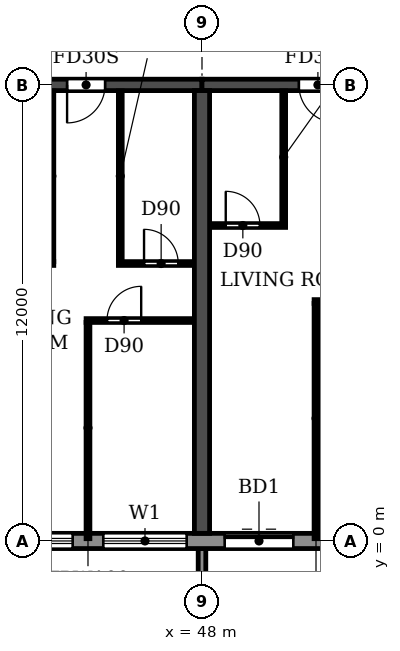
"""IFC4 building model, lengths in metres.
Left out: names, types, materials, properties, quantities, classifications, styles, units other than length and angle.
Written with IfcOpenShell. Run it as: python <this file> out.ifc"""

import sys

from ifc_helpers import new_model, si_unit, direction, frame, frame_2d, origin, place, context, subcontext, project, spatial, polyline, rectangle, outline, extrude, source, transform, mapped, element, fill, save


model = new_model("IFC4")
c1 = context("Model", 3, precision=1e-05, world=origin(), true_north=direction((0.0, 1.0)))
c2 = subcontext(c1, "Body", "Model", "MODEL_VIEW")
j1 = project(units=[si_unit("LENGTHUNIT", "METRE"), si_unit("PLANEANGLEUNIT", "RADIAN")], contexts=[c1])
p1 = place(None, origin())
s1 = spatial("IfcSite", under=j1, at=p1, CompositionType="ELEMENT")
p2 = place(p1, origin())
s2 = spatial("IfcBuilding", under=s1, at=p2, CompositionType="ELEMENT")
p3 = place(p2, frame((0.0, 0.0, 23.4)))
s3 = spatial("IfcBuildingStorey", under=s2, at=p3, CompositionType="ELEMENT", Elevation=23.4)
p4 = place(p3, frame((48.0, 0.2, 0.0), z_axis=(0.0, 0.0, 1.0), x_axis=(0.0, 1.0, 0.0)))
e1 = element("IfcWall", 1, at=p4, inside=s3, PredefinedType="SHEAR", context=c2, shape_type="SweptSolid", body=[
    extrude(rectangle(XDim=11.65, YDim=0.4, at=frame_2d((5.825, 0.0))), origin(), (0.0, 0.0, 1.0), 3.05),
])
p5 = place(p3, frame((42.0, 12.0, 0.0), z_axis=(0.0, 0.0, 1.0), x_axis=(1.0, 0.0, 0.0)))
e2 = element("IfcWall", 2, at=p5, inside=s3, PredefinedType="SHEAR", context=c2, shape_type="SweptSolid", body=[
    extrude(rectangle(XDim=6.0, YDim=0.3, at=frame_2d((3.0, 0.0))), origin(), (0.0, 0.0, 1.0), 2.45),
])
p6 = place(p5, frame((2.45, 0.0, 0.0)))
e3 = element("IfcOpeningElement", 3, at=p6, cuts=e2, PredefinedType="OPENING", context=c2, shape_type="SweptSolid", body=[
    extrude(rectangle(XDim=1.0, YDim=2.1, at=frame_2d((0.5, 1.05))), frame((0.0, 0.16, 0.0), z_axis=(0.0, -1.0, 0.0), x_axis=(1.0, 0.0, 0.0)), (0.0, 0.0, 1.0), 0.32),
])
p7 = place(p3, frame((48.0, 12.0, 0.0), z_axis=(0.0, 0.0, 1.0), x_axis=(1.0, 0.0, 0.0)))
e4 = element("IfcWall", 4, at=p7, inside=s3, PredefinedType="SHEAR", context=c2, shape_type="SweptSolid", body=[
    extrude(rectangle(XDim=6.0, YDim=0.3, at=frame_2d((3.0, 0.0))), origin(), (0.0, 0.0, 1.0), 2.45),
])
p8 = place(p7, frame((2.55, 0.0, 0.0)))
e5 = element("IfcOpeningElement", 5, at=p8, cuts=e4, PredefinedType="OPENING", context=c2, shape_type="SweptSolid", body=[
    extrude(rectangle(XDim=1.0, YDim=2.1, at=frame_2d((0.5, 1.05))), frame((0.0, 0.16, 0.0), z_axis=(0.0, -1.0, 0.0), x_axis=(1.0, 0.0, 0.0)), (0.0, 0.0, 1.0), 0.32),
])
p9 = place(p3, frame((4.683, 0.0, 0.0), z_axis=(0.0, 0.0, 1.0), x_axis=(1.0, 0.0, 0.0)))
e6 = element("IfcWall", 6, at=p9, inside=s3, PredefinedType="STANDARD", context=c2, shape_type="SweptSolid", body=[
    extrude(rectangle(XDim=92.634, YDim=0.4, at=frame_2d((46.317, 0.0))), origin(), (0.0, 0.0, 1.0), 3.05),
])
p10 = place(p9, frame((1.717, 0.0, 0.9)))
e7 = element("IfcOpeningElement", 7, at=p10, cuts=e6, PredefinedType="OPENING", context=c2, shape_type="SweptSolid", body=[
    extrude(rectangle(XDim=2.2, YDim=1.5, at=frame_2d((1.1, 0.75))), frame((0.0, 0.21, 0.0), z_axis=(0.0, -1.0, 0.0), x_axis=(1.0, 0.0, 0.0)), (0.0, 0.0, 1.0), 0.42),
])
p11 = place(p9, frame((4.717, 0.0, 0.9)))
e8 = element("IfcOpeningElement", 8, at=p11, cuts=e6, PredefinedType="OPENING", context=c2, shape_type="SweptSolid", body=[
    extrude(rectangle(XDim=2.2, YDim=1.5, at=frame_2d((1.1, 0.75))), frame((0.0, 0.21, 0.0), z_axis=(0.0, -1.0, 0.0), x_axis=(1.0, 0.0, 0.0)), (0.0, 0.0, 1.0), 0.42),
])
p12 = place(p9, frame((7.717, 0.0, 0.9)))
e9 = element("IfcOpeningElement", 9, at=p12, cuts=e6, PredefinedType="OPENING", context=c2, shape_type="SweptSolid", body=[
    extrude(rectangle(XDim=2.2, YDim=1.5, at=frame_2d((1.1, 0.75))), frame((0.0, 0.21, 0.0), z_axis=(0.0, -1.0, 0.0), x_axis=(1.0, 0.0, 0.0)), (0.0, 0.0, 1.0), 0.42),
])
p13 = place(p9, frame((10.717, 0.0, 0.9)))
e10 = element("IfcOpeningElement", 10, at=p13, cuts=e6, PredefinedType="OPENING", context=c2, shape_type="SweptSolid", body=[
    extrude(rectangle(XDim=2.2, YDim=1.5, at=frame_2d((1.1, 0.75))), frame((0.0, 0.21, 0.0), z_axis=(0.0, -1.0, 0.0), x_axis=(1.0, 0.0, 0.0)), (0.0, 0.0, 1.0), 0.42),
])
p14 = place(p9, frame((13.717, 0.0, 0.9)))
e11 = element("IfcOpeningElement", 11, at=p14, cuts=e6, PredefinedType="OPENING", context=c2, shape_type="SweptSolid", body=[
    extrude(rectangle(XDim=2.2, YDim=1.5, at=frame_2d((1.1, 0.75))), frame((0.0, 0.21, 0.0), z_axis=(0.0, -1.0, 0.0), x_axis=(1.0, 0.0, 0.0)), (0.0, 0.0, 1.0), 0.42),
])
p15 = place(p9, frame((16.717, 0.0, 0.9)))
e12 = element("IfcOpeningElement", 12, at=p15, cuts=e6, PredefinedType="OPENING", context=c2, shape_type="SweptSolid", body=[
    extrude(rectangle(XDim=2.2, YDim=1.5, at=frame_2d((1.1, 0.75))), frame((0.0, 0.21, 0.0), z_axis=(0.0, -1.0, 0.0), x_axis=(1.0, 0.0, 0.0)), (0.0, 0.0, 1.0), 0.42),
])
p16 = place(p9, frame((19.917, 0.0, 0.0)))
e13 = element("IfcOpeningElement", 13, at=p16, cuts=e6, PredefinedType="OPENING", context=c2, shape_type="SweptSolid", body=[
    extrude(rectangle(XDim=1.8, YDim=2.4, at=frame_2d((0.9, 1.2))), frame((0.0, 0.21, 0.0), z_axis=(0.0, -1.0, 0.0), x_axis=(1.0, 0.0, 0.0)), (0.0, 0.0, 1.0), 0.42),
])
p17 = place(p9, frame((22.717, 0.0, 0.9)))
e14 = element("IfcOpeningElement", 14, at=p17, cuts=e6, PredefinedType="OPENING", context=c2, shape_type="SweptSolid", body=[
    extrude(rectangle(XDim=2.2, YDim=1.5, at=frame_2d((1.1, 0.75))), frame((0.0, 0.21, 0.0), z_axis=(0.0, -1.0, 0.0), x_axis=(1.0, 0.0, 0.0)), (0.0, 0.0, 1.0), 0.42),
])
p18 = place(p9, frame((25.717, 0.0, 0.9)))
e15 = element("IfcOpeningElement", 15, at=p18, cuts=e6, PredefinedType="OPENING", context=c2, shape_type="SweptSolid", body=[
    extrude(rectangle(XDim=2.2, YDim=1.5, at=frame_2d((1.1, 0.75))), frame((0.0, 0.21, 0.0), z_axis=(0.0, -1.0, 0.0), x_axis=(1.0, 0.0, 0.0)), (0.0, 0.0, 1.0), 0.42),
])
p19 = place(p9, frame((28.717, 0.0, 0.9)))
e16 = element("IfcOpeningElement", 16, at=p19, cuts=e6, PredefinedType="OPENING", context=c2, shape_type="SweptSolid", body=[
    extrude(rectangle(XDim=2.2, YDim=1.5, at=frame_2d((1.1, 0.75))), frame((0.0, 0.21, 0.0), z_axis=(0.0, -1.0, 0.0), x_axis=(1.0, 0.0, 0.0)), (0.0, 0.0, 1.0), 0.42),
])
p20 = place(p9, frame((31.917, 0.0, 0.0)))
e17 = element("IfcOpeningElement", 17, at=p20, cuts=e6, PredefinedType="OPENING", context=c2, shape_type="SweptSolid", body=[
    extrude(rectangle(XDim=1.8, YDim=2.4, at=frame_2d((0.9, 1.2))), frame((0.0, 0.21, 0.0), z_axis=(0.0, -1.0, 0.0), x_axis=(1.0, 0.0, 0.0)), (0.0, 0.0, 1.0), 0.42),
])
p21 = place(p9, frame((34.717, 0.0, 0.9)))
e18 = element("IfcOpeningElement", 18, at=p21, cuts=e6, PredefinedType="OPENING", context=c2, shape_type="SweptSolid", body=[
    extrude(rectangle(XDim=2.2, YDim=1.5, at=frame_2d((1.1, 0.75))), frame((0.0, 0.21, 0.0), z_axis=(0.0, -1.0, 0.0), x_axis=(1.0, 0.0, 0.0)), (0.0, 0.0, 1.0), 0.42),
])
p22 = place(p9, frame((37.717, 0.0, 0.9)))
e19 = element("IfcOpeningElement", 19, at=p22, cuts=e6, PredefinedType="OPENING", context=c2, shape_type="SweptSolid", body=[
    extrude(rectangle(XDim=2.2, YDim=1.5, at=frame_2d((1.1, 0.75))), frame((0.0, 0.21, 0.0), z_axis=(0.0, -1.0, 0.0), x_axis=(1.0, 0.0, 0.0)), (0.0, 0.0, 1.0), 0.42),
])
p23 = place(p9, frame((40.717, 0.0, 0.9)))
e20 = element("IfcOpeningElement", 20, at=p23, cuts=e6, PredefinedType="OPENING", context=c2, shape_type="SweptSolid", body=[
    extrude(rectangle(XDim=2.2, YDim=1.5, at=frame_2d((1.1, 0.75))), frame((0.0, 0.21, 0.0), z_axis=(0.0, -1.0, 0.0), x_axis=(1.0, 0.0, 0.0)), (0.0, 0.0, 1.0), 0.42),
])
p24 = place(p9, frame((43.917, 0.0, 0.0)))
e21 = element("IfcOpeningElement", 21, at=p24, cuts=e6, PredefinedType="OPENING", context=c2, shape_type="SweptSolid", body=[
    extrude(rectangle(XDim=1.8, YDim=2.4, at=frame_2d((0.9, 1.2))), frame((0.0, 0.21, 0.0), z_axis=(0.0, -1.0, 0.0), x_axis=(1.0, 0.0, 0.0)), (0.0, 0.0, 1.0), 0.42),
])
p25 = place(p9, frame((46.717, 0.0, 0.9)))
e22 = element("IfcOpeningElement", 22, at=p25, cuts=e6, PredefinedType="OPENING", context=c2, shape_type="SweptSolid", body=[
    extrude(rectangle(XDim=2.2, YDim=1.5, at=frame_2d((1.1, 0.75))), frame((0.0, 0.21, 0.0), z_axis=(0.0, -1.0, 0.0), x_axis=(1.0, 0.0, 0.0)), (0.0, 0.0, 1.0), 0.42),
])
p26 = place(p9, frame((49.717, 0.0, 0.9)))
e23 = element("IfcOpeningElement", 23, at=p26, cuts=e6, PredefinedType="OPENING", context=c2, shape_type="SweptSolid", body=[
    extrude(rectangle(XDim=2.2, YDim=1.5, at=frame_2d((1.1, 0.75))), frame((0.0, 0.21, 0.0), z_axis=(0.0, -1.0, 0.0), x_axis=(1.0, 0.0, 0.0)), (0.0, 0.0, 1.0), 0.42),
])
p27 = place(p9, frame((52.717, 0.0, 0.9)))
e24 = element("IfcOpeningElement", 24, at=p27, cuts=e6, PredefinedType="OPENING", context=c2, shape_type="SweptSolid", body=[
    extrude(rectangle(XDim=2.2, YDim=1.5, at=frame_2d((1.1, 0.75))), frame((0.0, 0.21, 0.0), z_axis=(0.0, -1.0, 0.0), x_axis=(1.0, 0.0, 0.0)), (0.0, 0.0, 1.0), 0.42),
])
p28 = place(p9, frame((55.717, 0.0, 0.9)))
e25 = element("IfcOpeningElement", 25, at=p28, cuts=e6, PredefinedType="OPENING", context=c2, shape_type="SweptSolid", body=[
    extrude(rectangle(XDim=2.2, YDim=1.5, at=frame_2d((1.1, 0.75))), frame((0.0, 0.21, 0.0), z_axis=(0.0, -1.0, 0.0), x_axis=(1.0, 0.0, 0.0)), (0.0, 0.0, 1.0), 0.42),
])
p29 = place(p9, frame((58.917, 0.0, 0.0)))
e26 = element("IfcOpeningElement", 26, at=p29, cuts=e6, PredefinedType="OPENING", context=c2, shape_type="SweptSolid", body=[
    extrude(rectangle(XDim=1.8, YDim=2.4, at=frame_2d((0.9, 1.2))), frame((0.0, 0.21, 0.0), z_axis=(0.0, -1.0, 0.0), x_axis=(1.0, 0.0, 0.0)), (0.0, 0.0, 1.0), 0.42),
])
p30 = place(p9, frame((61.717, 0.0, 0.9)))
e27 = element("IfcOpeningElement", 27, at=p30, cuts=e6, PredefinedType="OPENING", context=c2, shape_type="SweptSolid", body=[
    extrude(rectangle(XDim=2.2, YDim=1.5, at=frame_2d((1.1, 0.75))), frame((0.0, 0.21, 0.0), z_axis=(0.0, -1.0, 0.0), x_axis=(1.0, 0.0, 0.0)), (0.0, 0.0, 1.0), 0.42),
])
p31 = place(p9, frame((64.717, 0.0, 0.9)))
e28 = element("IfcOpeningElement", 28, at=p31, cuts=e6, PredefinedType="OPENING", context=c2, shape_type="SweptSolid", body=[
    extrude(rectangle(XDim=2.2, YDim=1.5, at=frame_2d((1.1, 0.75))), frame((0.0, 0.21, 0.0), z_axis=(0.0, -1.0, 0.0), x_axis=(1.0, 0.0, 0.0)), (0.0, 0.0, 1.0), 0.42),
])
p32 = place(p9, frame((67.717, 0.0, 0.9)))
e29 = element("IfcOpeningElement", 29, at=p32, cuts=e6, PredefinedType="OPENING", context=c2, shape_type="SweptSolid", body=[
    extrude(rectangle(XDim=2.2, YDim=1.5, at=frame_2d((1.1, 0.75))), frame((0.0, 0.21, 0.0), z_axis=(0.0, -1.0, 0.0), x_axis=(1.0, 0.0, 0.0)), (0.0, 0.0, 1.0), 0.42),
])
p33 = place(p9, frame((70.917, 0.0, 0.0)))
e30 = element("IfcOpeningElement", 30, at=p33, cuts=e6, PredefinedType="OPENING", context=c2, shape_type="SweptSolid", body=[
    extrude(rectangle(XDim=1.8, YDim=2.4, at=frame_2d((0.9, 1.2))), frame((0.0, 0.21, 0.0), z_axis=(0.0, -1.0, 0.0), x_axis=(1.0, 0.0, 0.0)), (0.0, 0.0, 1.0), 0.42),
])
p34 = place(p9, frame((73.717, 0.0, 0.9)))
e31 = element("IfcOpeningElement", 31, at=p34, cuts=e6, PredefinedType="OPENING", context=c2, shape_type="SweptSolid", body=[
    extrude(rectangle(XDim=2.2, YDim=1.5, at=frame_2d((1.1, 0.75))), frame((0.0, 0.21, 0.0), z_axis=(0.0, -1.0, 0.0), x_axis=(1.0, 0.0, 0.0)), (0.0, 0.0, 1.0), 0.42),
])
p35 = place(p9, frame((76.717, 0.0, 0.9)))
e32 = element("IfcOpeningElement", 32, at=p35, cuts=e6, PredefinedType="OPENING", context=c2, shape_type="SweptSolid", body=[
    extrude(rectangle(XDim=2.2, YDim=1.5, at=frame_2d((1.1, 0.75))), frame((0.0, 0.21, 0.0), z_axis=(0.0, -1.0, 0.0), x_axis=(1.0, 0.0, 0.0)), (0.0, 0.0, 1.0), 0.42),
])
p36 = place(p9, frame((79.717, 0.0, 0.9)))
e33 = element("IfcOpeningElement", 33, at=p36, cuts=e6, PredefinedType="OPENING", context=c2, shape_type="SweptSolid", body=[
    extrude(rectangle(XDim=2.2, YDim=1.5, at=frame_2d((1.1, 0.75))), frame((0.0, 0.21, 0.0), z_axis=(0.0, -1.0, 0.0), x_axis=(1.0, 0.0, 0.0)), (0.0, 0.0, 1.0), 0.42),
])
p37 = place(p9, frame((82.717, 0.0, 0.9)))
e34 = element("IfcOpeningElement", 34, at=p37, cuts=e6, PredefinedType="OPENING", context=c2, shape_type="SweptSolid", body=[
    extrude(rectangle(XDim=2.2, YDim=1.5, at=frame_2d((1.1, 0.75))), frame((0.0, 0.21, 0.0), z_axis=(0.0, -1.0, 0.0), x_axis=(1.0, 0.0, 0.0)), (0.0, 0.0, 1.0), 0.42),
])
p38 = place(p9, frame((85.717, 0.0, 0.9)))
e35 = element("IfcOpeningElement", 35, at=p38, cuts=e6, PredefinedType="OPENING", context=c2, shape_type="SweptSolid", body=[
    extrude(rectangle(XDim=2.2, YDim=1.5, at=frame_2d((1.1, 0.75))), frame((0.0, 0.21, 0.0), z_axis=(0.0, -1.0, 0.0), x_axis=(1.0, 0.0, 0.0)), (0.0, 0.0, 1.0), 0.42),
])
p39 = place(p9, frame((88.717, 0.0, 0.9)))
e36 = element("IfcOpeningElement", 36, at=p39, cuts=e6, PredefinedType="OPENING", context=c2, shape_type="SweptSolid", body=[
    extrude(rectangle(XDim=2.2, YDim=1.5, at=frame_2d((1.1, 0.75))), frame((0.0, 0.21, 0.0), z_axis=(0.0, -1.0, 0.0), x_axis=(1.0, 0.0, 0.0)), (0.0, 0.0, 1.0), 0.42),
])
m1 = source(origin(), c2, "Body", "SweptSolid", [
    extrude(outline(polyline([(0.0, 0.0), (0.2, 0.0), (0.2, 1.65), (0.0, 1.65), (0.0, 0.0)])), origin(), (0.0, 0.0, 1.0), 3.1),
])
p40 = place(p3, frame((47.9, -1.85, 0.0)))
e37 = element("IfcWall", 37, at=p40, inside=s3, PredefinedType="STANDARD", context=c2, shape_type="MappedRepresentation", body=[
    mapped(m1, transform((0.0, 0.0, 0.0))),
])
p41 = place(p3, frame((44.95, 5.8, 0.0), z_axis=(0.0, 0.0, 1.0), x_axis=(1.0, 0.0, 0.0)))
e38 = element("IfcWall", 38, at=p41, inside=s3, PredefinedType="PARTITIONING", context=c2, shape_type="SweptSolid", body=[
    extrude(rectangle(XDim=2.84, YDim=0.1, at=frame_2d((1.42, 0.0))), origin(), (0.0, 0.0, 1.0), 3.05),
])
p42 = place(p41, frame((0.55, 0.0, 0.0)))
e39 = element("IfcOpeningElement", 39, at=p42, cuts=e38, PredefinedType="OPENING", context=c2, shape_type="SweptSolid", body=[
    extrude(rectangle(XDim=0.9, YDim=2.1, at=frame_2d((0.45, 1.05))), frame((0.0, 0.06, 0.0), z_axis=(0.0, -1.0, 0.0), x_axis=(1.0, 0.0, 0.0)), (0.0, 0.0, 1.0), 0.12),
])
p43 = place(p3, frame((50.95, 6.3, 0.0), z_axis=(0.0, 0.0, 1.0), x_axis=(1.0, 0.0, 0.0)))
e40 = element("IfcWall", 40, at=p43, inside=s3, PredefinedType="PARTITIONING", context=c2, shape_type="SweptSolid", body=[
    extrude(rectangle(XDim=2.84, YDim=0.1, at=frame_2d((1.42, 0.0))), origin(), (0.0, 0.0, 1.0), 3.05),
])
p44 = place(p43, frame((1.65, 0.0, 0.0)))
e41 = element("IfcOpeningElement", 41, at=p44, cuts=e40, PredefinedType="OPENING", context=c2, shape_type="SweptSolid", body=[
    extrude(rectangle(XDim=0.9, YDim=2.1, at=frame_2d((0.45, 1.05))), frame((0.0, 0.06, 0.0), z_axis=(0.0, -1.0, 0.0), x_axis=(1.0, 0.0, 0.0)), (0.0, 0.0, 1.0), 0.12),
])
p45 = place(p3, frame((42.21, 7.3, 0.0), z_axis=(0.0, 0.0, 1.0), x_axis=(1.0, 0.0, 0.0)))
e42 = element("IfcWall", 42, at=p45, inside=s3, PredefinedType="PARTITIONING", context=c2, shape_type="SweptSolid", body=[
    extrude(rectangle(XDim=1.89, YDim=0.1, at=frame_2d((0.945, 0.0))), origin(), (0.0, 0.0, 1.0), 3.05),
])
p46 = place(p45, frame((0.415, 0.0, 0.0)))
e43 = element("IfcOpeningElement", 43, at=p46, cuts=e42, PredefinedType="OPENING", context=c2, shape_type="SweptSolid", body=[
    extrude(rectangle(XDim=0.8, YDim=2.1, at=frame_2d((0.4, 1.05))), frame((0.0, 0.06, 0.0), z_axis=(0.0, -1.0, 0.0), x_axis=(1.0, 0.0, 0.0)), (0.0, 0.0, 1.0), 0.12),
])
p47 = place(p3, frame((45.8, 7.3, 0.0), z_axis=(0.0, 0.0, 1.0), x_axis=(1.0, 0.0, 0.0)))
e44 = element("IfcWall", 44, at=p47, inside=s3, PredefinedType="PARTITIONING", context=c2, shape_type="SweptSolid", body=[
    extrude(rectangle(XDim=1.99, YDim=0.1, at=frame_2d((0.995, 0.0))), origin(), (0.0, 0.0, 1.0), 3.05),
])
p48 = place(p47, frame((0.675, 0.0, 0.0)))
e45 = element("IfcOpeningElement", 45, at=p48, cuts=e44, PredefinedType="OPENING", context=c2, shape_type="SweptSolid", body=[
    extrude(rectangle(XDim=0.9, YDim=2.1, at=frame_2d((0.45, 1.05))), frame((0.0, 0.06, 0.0), z_axis=(0.0, -1.0, 0.0), x_axis=(1.0, 0.0, 0.0)), (0.0, 0.0, 1.0), 0.12),
])
p49 = place(p3, frame((48.21, 8.3, 0.0), z_axis=(0.0, 0.0, 1.0), x_axis=(1.0, 0.0, 0.0)))
e46 = element("IfcWall", 46, at=p49, inside=s3, PredefinedType="PARTITIONING", context=c2, shape_type="SweptSolid", body=[
    extrude(rectangle(XDim=1.99, YDim=0.1, at=frame_2d((0.995, 0.0))), origin(), (0.0, 0.0, 1.0), 3.05),
])
p50 = place(p49, frame((0.415, 0.0, 0.0)))
e47 = element("IfcOpeningElement", 47, at=p50, cuts=e46, PredefinedType="OPENING", context=c2, shape_type="SweptSolid", body=[
    extrude(rectangle(XDim=0.9, YDim=2.1, at=frame_2d((0.45, 1.05))), frame((0.0, 0.06, 0.0), z_axis=(0.0, -1.0, 0.0), x_axis=(1.0, 0.0, 0.0)), (0.0, 0.0, 1.0), 0.12),
])
p51 = place(p3, frame((44.05, 7.35, 0.0), z_axis=(0.0, 0.0, 1.0), x_axis=(0.0, 1.0, 0.0)))
e48 = element("IfcWall", 48, at=p51, inside=s3, PredefinedType="PARTITIONING", context=c2, shape_type="SweptSolid", body=[
    extrude(rectangle(XDim=4.49, YDim=0.1, at=frame_2d((2.245, 0.0))), origin(), (0.0, 0.0, 1.0), 3.05),
])
p52 = place(p3, frame((45.0, 0.06, 0.0), z_axis=(0.0, 0.0, 1.0), x_axis=(0.0, 1.0, 0.0)))
e49 = element("IfcWall", 49, at=p52, inside=s3, PredefinedType="PARTITIONING", context=c2, shape_type="SweptSolid", body=[
    extrude(rectangle(XDim=5.69, YDim=0.1, at=frame_2d((2.845, 0.0))), origin(), (0.0, 0.0, 1.0), 3.05),
])
p53 = place(p3, frame((45.85, 7.35, 0.0), z_axis=(0.0, 0.0, 1.0), x_axis=(0.0, 1.0, 0.0)))
e50 = element("IfcWall", 50, at=p53, inside=s3, PredefinedType="PARTITIONING", context=c2, shape_type="SweptSolid", body=[
    extrude(rectangle(XDim=4.49, YDim=0.1, at=frame_2d((2.245, 0.0))), origin(), (0.0, 0.0, 1.0), 3.05),
])
p54 = place(p3, frame((50.15, 8.35, 0.0), z_axis=(0.0, 0.0, 1.0), x_axis=(0.0, 1.0, 0.0)))
e51 = element("IfcWall", 51, at=p54, inside=s3, PredefinedType="PARTITIONING", context=c2, shape_type="SweptSolid", body=[
    extrude(rectangle(XDim=3.49, YDim=0.1, at=frame_2d((1.745, 0.0))), origin(), (0.0, 0.0, 1.0), 3.05),
])
p55 = place(p3, frame((51.0, 0.06, 0.0), z_axis=(0.0, 0.0, 1.0), x_axis=(0.0, 1.0, 0.0)))
e52 = element("IfcWall", 52, at=p55, inside=s3, PredefinedType="PARTITIONING", context=c2, shape_type="SweptSolid", body=[
    extrude(rectangle(XDim=6.19, YDim=0.1, at=frame_2d((3.095, 0.0))), origin(), (0.0, 0.0, 1.0), 3.05),
])
p56 = place(p22, origin())
e53 = element("IfcWindow", 53, at=p56, inside=s3, PartitioningType="DOUBLE_PANEL_HORIZONTAL", PredefinedType="WINDOW", context=c2, shape_type="SweptSolid", body=[
    extrude(rectangle(XDim=2.2, YDim=1.5, at=frame_2d((1.1, 0.75))), frame((0.0, 0.03, 0.0), z_axis=(0.0, -1.0, 0.0), x_axis=(1.0, 0.0, 0.0)), (0.0, 0.0, 1.0), 0.06),
])
fill(e19, e53)
p57 = place(p23, origin())
e54 = element("IfcWindow", 54, at=p57, inside=s3, PartitioningType="DOUBLE_PANEL_HORIZONTAL", PredefinedType="WINDOW", context=c2, shape_type="SweptSolid", body=[
    extrude(rectangle(XDim=2.2, YDim=1.5, at=frame_2d((1.1, 0.75))), frame((0.0, 0.03, 0.0), z_axis=(0.0, -1.0, 0.0), x_axis=(1.0, 0.0, 0.0)), (0.0, 0.0, 1.0), 0.06),
])
fill(e20, e54)
p58 = place(p24, origin())
e55 = element("IfcDoor", 55, at=p58, inside=s3, OperationType="DOUBLE_DOOR_SLIDING", PredefinedType="DOOR", context=c2, shape_type="SweptSolid", body=[
    extrude(rectangle(XDim=1.8, YDim=2.4, at=frame_2d((0.9, 1.2))), frame((0.0, 0.025, 0.0), z_axis=(0.0, -1.0, 0.0), x_axis=(1.0, 0.0, 0.0)), (0.0, 0.0, 1.0), 0.05),
])
fill(e21, e55)
p59 = place(p6, frame((1.0, 0.0, 0.0), z_axis=(0.0, 0.0, 1.0), x_axis=(-1.0, 0.0, 0.0)))
e56 = element("IfcDoor", 56, at=p59, inside=s3, OperationType="SINGLE_SWING_RIGHT", PredefinedType="DOOR", context=c2, shape_type="SweptSolid", body=[
    extrude(rectangle(XDim=1.0, YDim=2.1, at=frame_2d((0.5, 1.05))), frame((0.0, 0.025, 0.0), z_axis=(0.0, -1.0, 0.0), x_axis=(1.0, 0.0, 0.0)), (0.0, 0.0, 1.0), 0.05),
])
fill(e3, e56)
p60 = place(p42, origin())
e57 = element("IfcDoor", 57, at=p60, inside=s3, OperationType="SINGLE_SWING_RIGHT", PredefinedType="DOOR", context=c2, shape_type="SweptSolid", body=[
    extrude(rectangle(XDim=0.9, YDim=2.1, at=frame_2d((0.45, 1.05))), frame((0.0, 0.025, 0.0), z_axis=(0.0, -1.0, 0.0), x_axis=(1.0, 0.0, 0.0)), (0.0, 0.0, 1.0), 0.05),
])
fill(e39, e57)
p61 = place(p48, origin())
e58 = element("IfcDoor", 58, at=p61, inside=s3, OperationType="SINGLE_SWING_LEFT", PredefinedType="DOOR", context=c2, shape_type="SweptSolid", body=[
    extrude(rectangle(XDim=0.9, YDim=2.1, at=frame_2d((0.45, 1.05))), frame((0.0, 0.025, 0.0), z_axis=(0.0, -1.0, 0.0), x_axis=(1.0, 0.0, 0.0)), (0.0, 0.0, 1.0), 0.05),
])
fill(e45, e58)
p62 = place(p50, origin())
e59 = element("IfcDoor", 59, at=p62, inside=s3, OperationType="SINGLE_SWING_LEFT", PredefinedType="DOOR", context=c2, shape_type="SweptSolid", body=[
    extrude(rectangle(XDim=0.9, YDim=2.1, at=frame_2d((0.45, 1.05))), frame((0.0, 0.025, 0.0), z_axis=(0.0, -1.0, 0.0), x_axis=(1.0, 0.0, 0.0)), (0.0, 0.0, 1.0), 0.05),
])
fill(e47, e59)
p63 = place(p8, frame((1.0, 0.0, 0.0), z_axis=(0.0, 0.0, 1.0), x_axis=(-1.0, 0.0, 0.0)))
e60 = element("IfcDoor", 60, at=p63, inside=s3, OperationType="SINGLE_SWING_LEFT", PredefinedType="DOOR", context=c2, shape_type="SweptSolid", body=[
    extrude(rectangle(XDim=1.0, YDim=2.1, at=frame_2d((0.5, 1.05))), frame((0.0, 0.025, 0.0), z_axis=(0.0, -1.0, 0.0), x_axis=(1.0, 0.0, 0.0)), (0.0, 0.0, 1.0), 0.05),
])
fill(e5, e60)
save(model, sys.argv[1])
